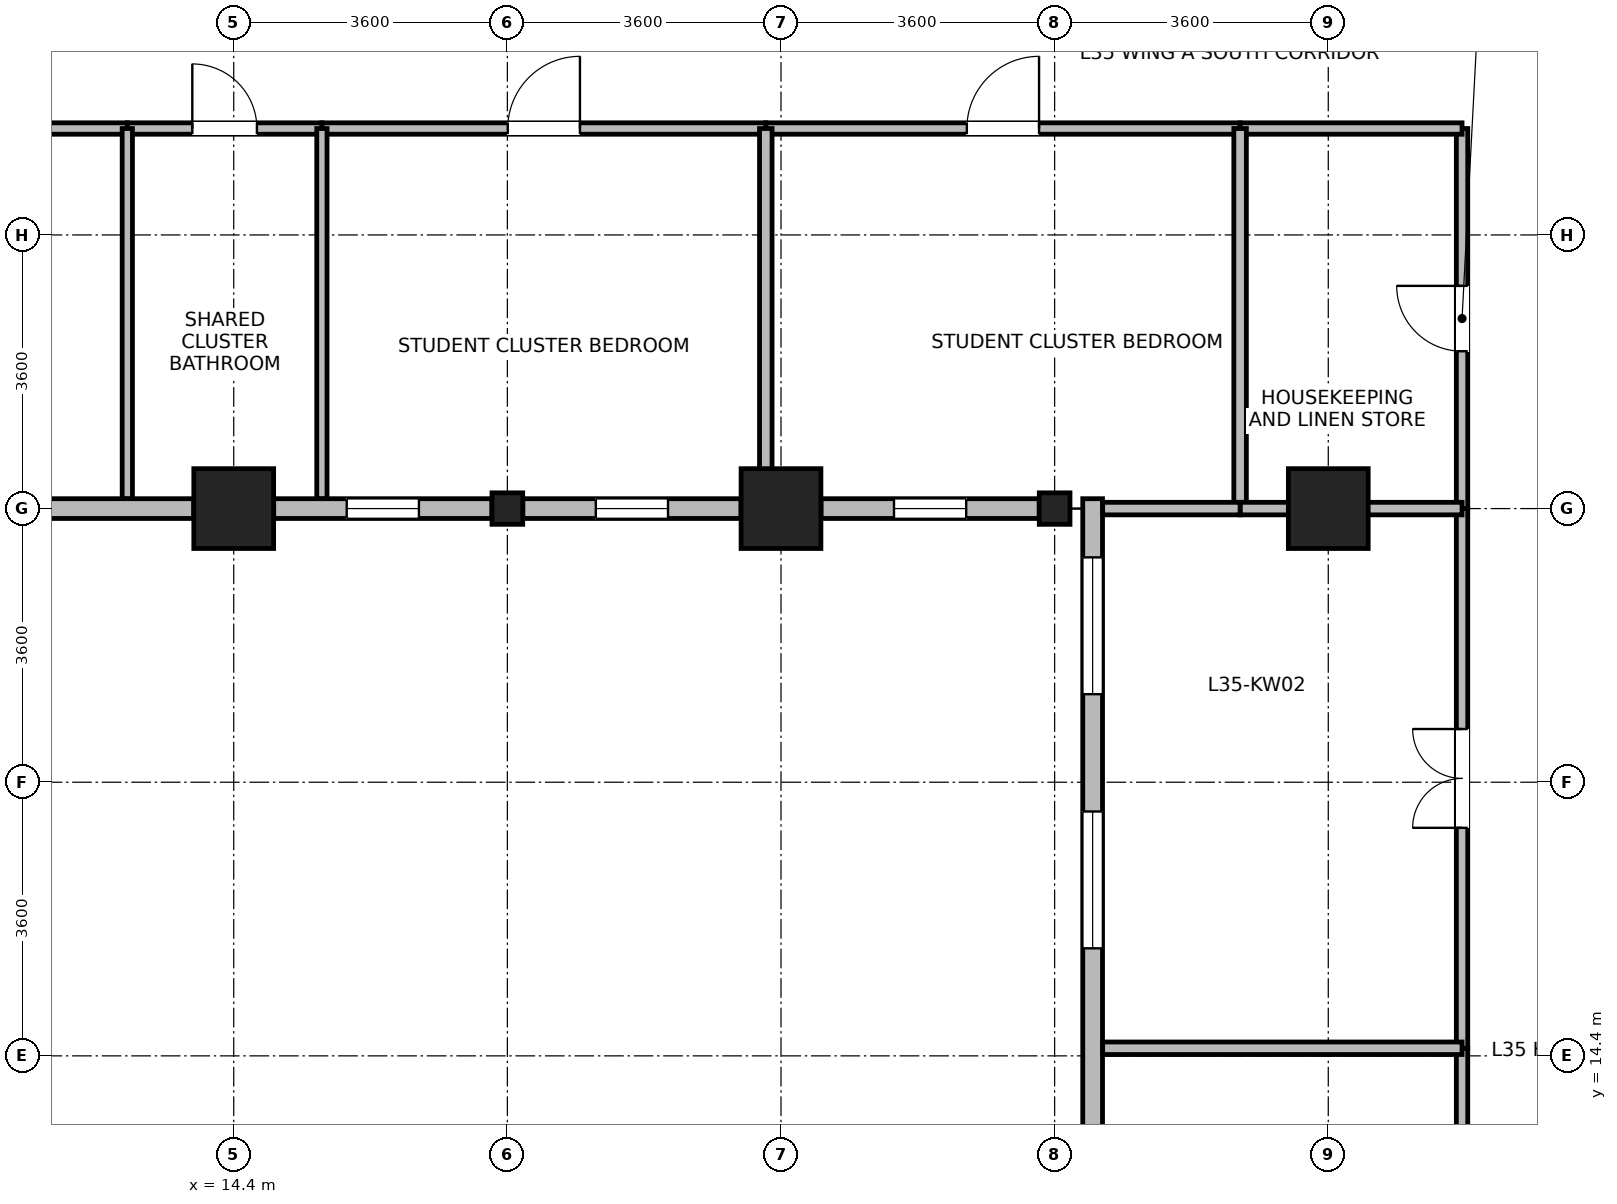
"""IFC4 building model, lengths in metres.
Left out: names, types, materials, properties, quantities, classifications, styles, units other than length and angle.
Written with IfcOpenShell. Run it as: python <this file> out.ifc"""

import sys

from ifc_helpers import new_model, si_unit, direction, frame, frame_2d, origin, origin_2d, place, context, subcontext, project, spatial, rectangle, i_section, extrude, source, transform, mapped, element, fill, save


model = new_model("IFC4")
c1 = context("Model", 3, precision=1e-05, world=origin(), true_north=direction((0.0, 1.0)))
c2 = subcontext(c1, "Body", "Model", "MODEL_VIEW")
j1 = project(units=[si_unit("LENGTHUNIT", "METRE"), si_unit("PLANEANGLEUNIT", "RADIAN")], contexts=[c1])
p1 = place(None, origin())
s1 = spatial("IfcSite", under=j1, at=p1, CompositionType="ELEMENT")
p2 = place(p1, origin())
s2 = spatial("IfcBuilding", under=s1, at=p2, CompositionType="ELEMENT")
p3 = place(p2, frame((0.0, 0.0, 140.2)))
s3 = spatial("IfcBuildingStorey", under=s2, at=p3, CompositionType="ELEMENT", Elevation=140.2)
m1 = source(origin(), c2, "Body", "SweptSolid", [
    extrude(rectangle(XDim=1.05, YDim=1.05, at=origin_2d()), origin(), (0.0, 0.0, 1.0), 3.7),
])
for number, where, z_axis, x_axis in (
    (1, (14.4, 21.6, 0.0), (0.0, 0.0, 1.0), (1.0, 0.0, 0.0)),
    (2, (21.6, 21.6, 0.0), (0.0, 0.0, 1.0), (1.0, 0.0, 0.0)),
    (3, (28.8, 21.6, 0.0), (0.0, 0.0, 1.0), (1.0, 0.0, 0.0)),
):
    element("IfcColumn", number, at=place(p3, frame(where, z_axis=z_axis, x_axis=x_axis)), inside=s3, PredefinedType="COLUMN", context=c2, shape_type="MappedRepresentation", body=[
        mapped(m1, transform((0.0, 0.0, 0.0), x_axis=(1.0, 0.0, 0.0), y_axis=(0.0, 1.0, 0.0), z_axis=(0.0, 0.0, 1.0), scale=1.0)),
    ])
m2 = source(origin(), c2, "Body", "SweptSolid", [
    extrude(i_section(OverallWidth=0.404, OverallDepth=0.414, WebThickness=0.021, FlangeThickness=0.028, FilletRadius=0.015, at=origin_2d()), origin(), (0.0, 0.0, 1.0), 3.7),
])
for number, where, z_axis, x_axis in (
    (4, (18.0, 21.6, 0.0), (0.0, 0.0, 1.0), (1.0, 0.0, 0.0)),
    (5, (25.2, 21.6, 0.0), (0.0, 0.0, 1.0), (1.0, 0.0, 0.0)),
):
    element("IfcColumn", number, at=place(p3, frame(where, z_axis=z_axis, x_axis=x_axis)), inside=s3, PredefinedType="COLUMN", context=c2, shape_type="MappedRepresentation", body=[
        mapped(m2, transform((0.0, 0.0, 0.0), x_axis=(1.0, 0.0, 0.0), y_axis=(0.0, 1.0, 0.0), z_axis=(0.0, 0.0, 1.0), scale=1.0)),
    ])
p4 = place(p3, frame((13.874, 21.6, 0.0), z_axis=(0.0, 0.0, 1.0), x_axis=(-1.0, 0.0, 0.0)))
e6 = element("IfcWall", 6, at=p4, inside=s3, PredefinedType="STANDARD", context=c2, shape_type="SweptSolid", body=[
    extrude(rectangle(XDim=13.337, YDim=0.26, at=frame_2d((6.668, 0.0))), origin(), (0.0, 0.0, 1.0), 3.44),
])
p5 = place(p4, frame((4.101, 0.0, 0.85)))
e7 = element("IfcOpeningElement", 7, at=p5, cuts=e6, PredefinedType="OPENING", context=c2, shape_type="SweptSolid", body=[
    extrude(rectangle(XDim=1.8, YDim=1.85, at=frame_2d((0.9, 0.925))), frame((0.0, 0.14, 0.0), z_axis=(0.0, -1.0, 0.0), x_axis=(1.0, 0.0, 0.0)), (0.0, 0.0, 1.0), 0.28),
])
p6 = place(p4, frame((7.436, 0.0, 0.85)))
e8 = element("IfcOpeningElement", 8, at=p6, cuts=e6, PredefinedType="OPENING", context=c2, shape_type="SweptSolid", body=[
    extrude(rectangle(XDim=1.8, YDim=1.85, at=frame_2d((0.9, 0.925))), frame((0.0, 0.14, 0.0), z_axis=(0.0, -1.0, 0.0), x_axis=(1.0, 0.0, 0.0)), (0.0, 0.0, 1.0), 0.28),
])
p7 = place(p4, frame((10.77, 0.0, 0.85)))
e9 = element("IfcOpeningElement", 9, at=p7, cuts=e6, PredefinedType="OPENING", context=c2, shape_type="SweptSolid", body=[
    extrude(rectangle(XDim=1.8, YDim=1.85, at=frame_2d((0.9, 0.925))), frame((0.0, 0.14, 0.0), z_axis=(0.0, -1.0, 0.0), x_axis=(1.0, 0.0, 0.0)), (0.0, 0.0, 1.0), 0.28),
])
p8 = place(p3, frame((17.797, 21.6, 0.0), z_axis=(0.0, 0.0, 1.0), x_axis=(-1.0, 0.0, 0.0)))
e10 = element("IfcWall", 10, at=p8, inside=s3, PredefinedType="STANDARD", context=c2, shape_type="SweptSolid", body=[
    extrude(rectangle(XDim=2.871, YDim=0.26, at=frame_2d((1.436, 0.0))), origin(), (0.0, 0.0, 1.0), 2.99),
])
p9 = place(p8, frame((0.96, 0.0, 0.85)))
e11 = element("IfcOpeningElement", 11, at=p9, cuts=e10, PredefinedType="OPENING", context=c2, shape_type="SweptSolid", body=[
    extrude(rectangle(XDim=0.95, YDim=1.75, at=frame_2d((0.475, 0.875))), frame((0.0, 0.14, 0.0), z_axis=(0.0, -1.0, 0.0), x_axis=(1.0, 0.0, 0.0)), (0.0, 0.0, 1.0), 0.28),
])
p10 = place(p3, frame((21.074, 21.6, 0.0), z_axis=(0.0, 0.0, 1.0), x_axis=(-1.0, 0.0, 0.0)))
e12 = element("IfcWall", 12, at=p10, inside=s3, PredefinedType="STANDARD", context=c2, shape_type="SweptSolid", body=[
    extrude(rectangle(XDim=2.871, YDim=0.26, at=frame_2d((1.436, 0.0))), origin(), (0.0, 0.0, 1.0), 2.99),
])
p11 = place(p10, frame((0.96, 0.0, 0.85)))
e13 = element("IfcOpeningElement", 13, at=p11, cuts=e12, PredefinedType="OPENING", context=c2, shape_type="SweptSolid", body=[
    extrude(rectangle(XDim=0.95, YDim=1.75, at=frame_2d((0.475, 0.875))), frame((0.0, 0.14, 0.0), z_axis=(0.0, -1.0, 0.0), x_axis=(1.0, 0.0, 0.0)), (0.0, 0.0, 1.0), 0.28),
])
p12 = place(p3, frame((24.997, 21.6, 0.0), z_axis=(0.0, 0.0, 1.0), x_axis=(-1.0, 0.0, 0.0)))
e14 = element("IfcWall", 14, at=p12, inside=s3, PredefinedType="STANDARD", context=c2, shape_type="SweptSolid", body=[
    extrude(rectangle(XDim=2.871, YDim=0.26, at=frame_2d((1.436, 0.0))), origin(), (0.0, 0.0, 1.0), 2.99),
])
p13 = place(p12, frame((0.96, 0.0, 0.85)))
e15 = element("IfcOpeningElement", 15, at=p13, cuts=e14, PredefinedType="OPENING", context=c2, shape_type="SweptSolid", body=[
    extrude(rectangle(XDim=0.95, YDim=1.75, at=frame_2d((0.475, 0.875))), frame((0.0, 0.14, 0.0), z_axis=(0.0, -1.0, 0.0), x_axis=(1.0, 0.0, 0.0)), (0.0, 0.0, 1.0), 0.28),
])
p14 = place(p3, frame((25.7, 1.67, 0.0), z_axis=(0.0, 0.0, 1.0), x_axis=(0.0, 1.0, 0.0)))
e16 = element("IfcWall", 16, at=p14, inside=s3, PredefinedType="STANDARD", context=c2, shape_type="SweptSolid", body=[
    extrude(rectangle(XDim=20.06, YDim=0.26, at=frame_2d((10.03, 0.0))), origin(), (0.0, 0.0, 1.0), 3.44),
])
p15 = place(p14, frame((0.772, 0.0, 0.85)))
e17 = element("IfcOpeningElement", 17, at=p15, cuts=e16, PredefinedType="OPENING", context=c2, shape_type="SweptSolid", body=[
    extrude(rectangle(XDim=1.8, YDim=1.85, at=frame_2d((0.9, 0.925))), frame((0.0, 0.14, 0.0), z_axis=(0.0, -1.0, 0.0), x_axis=(1.0, 0.0, 0.0)), (0.0, 0.0, 1.0), 0.28),
])
p16 = place(p14, frame((7.458, 0.0, 0.85)))
e18 = element("IfcOpeningElement", 18, at=p16, cuts=e16, PredefinedType="OPENING", context=c2, shape_type="SweptSolid", body=[
    extrude(rectangle(XDim=1.8, YDim=1.85, at=frame_2d((0.9, 0.925))), frame((0.0, 0.14, 0.0), z_axis=(0.0, -1.0, 0.0), x_axis=(1.0, 0.0, 0.0)), (0.0, 0.0, 1.0), 0.28),
])
p17 = place(p14, frame((14.145, 0.0, 0.85)))
e19 = element("IfcOpeningElement", 19, at=p17, cuts=e16, PredefinedType="OPENING", context=c2, shape_type="SweptSolid", body=[
    extrude(rectangle(XDim=1.8, YDim=1.85, at=frame_2d((0.9, 0.925))), frame((0.0, 0.14, 0.0), z_axis=(0.0, -1.0, 0.0), x_axis=(1.0, 0.0, 0.0)), (0.0, 0.0, 1.0), 0.28),
])
p18 = place(p14, frame((17.488, 0.0, 0.85)))
e20 = element("IfcOpeningElement", 20, at=p18, cuts=e16, PredefinedType="OPENING", context=c2, shape_type="SweptSolid", body=[
    extrude(rectangle(XDim=1.8, YDim=1.85, at=frame_2d((0.9, 0.925))), frame((0.0, 0.14, 0.0), z_axis=(0.0, -1.0, 0.0), x_axis=(1.0, 0.0, 0.0)), (0.0, 0.0, 1.0), 0.28),
])
p19 = place(p3, frame((0.52, 26.6, 0.0), z_axis=(0.0, 0.0, 1.0), x_axis=(1.0, 0.0, 0.0)))
e21 = element("IfcWall", 21, at=p19, inside=s3, PredefinedType="PARTITIONING", context=c2, shape_type="SweptSolid", body=[
    extrude(rectangle(XDim=12.48, YDim=0.15, at=frame_2d((6.24, 0.0))), origin(), (0.0, 0.0, 1.0), 3.44),
])
p20 = place(p19, frame((5.59, 0.0, 0.0)))
e22 = element("IfcOpeningElement", 22, at=p20, cuts=e21, PredefinedType="OPENING", context=c2, shape_type="SweptSolid", body=[
    extrude(rectangle(XDim=1.3, YDim=2.12, at=frame_2d((0.65, 1.06))), frame((0.0, 0.085, 0.0), z_axis=(0.0, -1.0, 0.0), x_axis=(1.0, 0.0, 0.0)), (0.0, 0.0, 1.0), 0.17),
])
p21 = place(p3, frame((30.56, 7.24, 0.0), z_axis=(0.0, 0.0, 1.0), x_axis=(0.0, 1.0, 0.0)))
e23 = element("IfcWall", 23, at=p21, inside=s3, PredefinedType="PARTITIONING", context=c2, shape_type="SweptSolid", body=[
    extrude(rectangle(XDim=7.26, YDim=0.15, at=frame_2d((3.63, 0.0))), origin(), (0.0, 0.0, 1.0), 3.44),
])
p22 = place(p21, frame((2.98, 0.0, 0.0)))
e24 = element("IfcOpeningElement", 24, at=p22, cuts=e23, PredefinedType="OPENING", context=c2, shape_type="SweptSolid", body=[
    extrude(rectangle(XDim=1.3, YDim=2.12, at=frame_2d((0.65, 1.06))), frame((0.0, 0.085, 0.0), z_axis=(0.0, -1.0, 0.0), x_axis=(1.0, 0.0, 0.0)), (0.0, 0.0, 1.0), 0.17),
])
p23 = place(p3, frame((30.56, 14.5, 0.0), z_axis=(0.0, 0.0, 1.0), x_axis=(0.0, 1.0, 0.0)))
e25 = element("IfcWall", 25, at=p23, inside=s3, PredefinedType="PARTITIONING", context=c2, shape_type="SweptSolid", body=[
    extrude(rectangle(XDim=7.1, YDim=0.15, at=frame_2d((3.55, 0.0))), origin(), (0.0, 0.0, 1.0), 3.44),
])
p24 = place(p23, frame((2.9, 0.0, 0.0)))
e26 = element("IfcOpeningElement", 26, at=p24, cuts=e25, PredefinedType="OPENING", context=c2, shape_type="SweptSolid", body=[
    extrude(rectangle(XDim=1.3, YDim=2.12, at=frame_2d((0.65, 1.06))), frame((0.0, 0.085, 0.0), z_axis=(0.0, -1.0, 0.0), x_axis=(1.0, 0.0, 0.0)), (0.0, 0.0, 1.0), 0.17),
])
p25 = place(p3, frame((21.4, 26.6, 0.0), z_axis=(0.0, 0.0, 1.0), x_axis=(1.0, 0.0, 0.0)))
e27 = element("IfcWall", 27, at=p25, inside=s3, PredefinedType="PARTITIONING", context=c2, shape_type="SweptSolid", body=[
    extrude(rectangle(XDim=6.24, YDim=0.15, at=frame_2d((3.12, 0.0))), origin(), (0.0, 0.0, 1.0), 3.44),
])
p26 = place(p25, frame((2.645, 0.0, 0.0)))
e28 = element("IfcOpeningElement", 28, at=p26, cuts=e27, PredefinedType="OPENING", context=c2, shape_type="SweptSolid", body=[
    extrude(rectangle(XDim=0.95, YDim=2.1, at=frame_2d((0.475, 1.05))), frame((0.0, 0.085, 0.0), z_axis=(0.0, -1.0, 0.0), x_axis=(1.0, 0.0, 0.0)), (0.0, 0.0, 1.0), 0.17),
])
p27 = place(p3, frame((15.56, 26.6, 0.0), z_axis=(0.0, 0.0, 1.0), x_axis=(1.0, 0.0, 0.0)))
e29 = element("IfcWall", 29, at=p27, inside=s3, PredefinedType="PARTITIONING", context=c2, shape_type="SweptSolid", body=[
    extrude(rectangle(XDim=5.84, YDim=0.15, at=frame_2d((2.92, 0.0))), origin(), (0.0, 0.0, 1.0), 3.44),
])
p28 = place(p27, frame((2.445, 0.0, 0.0)))
e30 = element("IfcOpeningElement", 30, at=p28, cuts=e29, PredefinedType="OPENING", context=c2, shape_type="SweptSolid", body=[
    extrude(rectangle(XDim=0.95, YDim=2.1, at=frame_2d((0.475, 1.05))), frame((0.0, 0.085, 0.0), z_axis=(0.0, -1.0, 0.0), x_axis=(1.0, 0.0, 0.0)), (0.0, 0.0, 1.0), 0.17),
])
p29 = place(p3, frame((30.56, 21.6, 0.0), z_axis=(0.0, 0.0, 1.0), x_axis=(0.0, 1.0, 0.0)))
e31 = element("IfcWall", 31, at=p29, inside=s3, PredefinedType="PARTITIONING", context=c2, shape_type="SweptSolid", body=[
    extrude(rectangle(XDim=5.0, YDim=0.15, at=frame_2d((2.5, 0.0))), origin(), (0.0, 0.0, 1.0), 3.44),
])
p30 = place(p29, frame((2.07, 0.0, 0.0)))
e32 = element("IfcOpeningElement", 32, at=p30, cuts=e31, PredefinedType="OPENING", context=c2, shape_type="SweptSolid", body=[
    extrude(rectangle(XDim=0.86, YDim=2.02, at=frame_2d((0.43, 1.01))), frame((0.0, 0.085, 0.0), z_axis=(0.0, -1.0, 0.0), x_axis=(1.0, 0.0, 0.0)), (0.0, 0.0, 1.0), 0.17),
])
p31 = place(p3, frame((27.64, 26.6, 0.0), z_axis=(0.0, 0.0, 1.0), x_axis=(1.0, 0.0, 0.0)))
e33 = element("IfcWall", 33, at=p31, inside=s3, PredefinedType="PARTITIONING", context=c2, shape_type="SweptSolid", body=[
    extrude(rectangle(XDim=2.92, YDim=0.15, at=frame_2d((1.46, 0.0))), origin(), (0.0, 0.0, 1.0), 3.44),
])
p32 = place(p3, frame((13.0, 26.6, 0.0), z_axis=(0.0, 0.0, 1.0), x_axis=(1.0, 0.0, 0.0)))
e34 = element("IfcWall", 34, at=p32, inside=s3, PredefinedType="PARTITIONING", context=c2, shape_type="SweptSolid", body=[
    extrude(rectangle(XDim=2.56, YDim=0.15, at=frame_2d((1.28, 0.0))), origin(), (0.0, 0.0, 1.0), 3.44),
])
p33 = place(p32, frame((0.855, 0.0, 0.0)))
e35 = element("IfcOpeningElement", 35, at=p33, cuts=e34, PredefinedType="OPENING", context=c2, shape_type="SweptSolid", body=[
    extrude(rectangle(XDim=0.85, YDim=2.04, at=frame_2d((0.425, 1.02))), frame((0.0, 0.085, 0.0), z_axis=(0.0, -1.0, 0.0), x_axis=(1.0, 0.0, 0.0)), (0.0, 0.0, 1.0), 0.17),
])
for number, where, z_axis, x_axis in (
    (36, (13.0, 21.732, 0.0), (0.0, 0.0, 1.0), (0.0, 1.0, 0.0)),
    (37, (15.56, 21.732, 0.0), (0.0, 0.0, 1.0), (0.0, 1.0, 0.0)),
):
    element("IfcWall", number, at=place(p3, frame(where, z_axis=z_axis, x_axis=x_axis)), inside=s3, PredefinedType="PARTITIONING", context=c2, shape_type="SweptSolid", body=[
        extrude(rectangle(XDim=4.868, YDim=0.135, at=frame_2d((2.434, 0.0))), origin(), (0.0, 0.0, 1.0), 3.44),
    ])
p34 = place(p3, frame((21.4, 21.732, 0.0), z_axis=(0.0, 0.0, 1.0), x_axis=(0.0, 1.0, 0.0)))
e38 = element("IfcWall", 38, at=p34, inside=s3, PredefinedType="PARTITIONING", context=c2, shape_type="SweptSolid", body=[
    extrude(rectangle(XDim=4.868, YDim=0.165, at=frame_2d((2.434, 0.0))), origin(), (0.0, 0.0, 1.0), 2.94),
])
p35 = place(p3, frame((27.64, 21.6, 0.0), z_axis=(0.0, 0.0, 1.0), x_axis=(0.0, 1.0, 0.0)))
e39 = element("IfcWall", 39, at=p35, inside=s3, PredefinedType="PARTITIONING", context=c2, shape_type="SweptSolid", body=[
    extrude(rectangle(XDim=5.0, YDim=0.165, at=frame_2d((2.5, 0.0))), origin(), (0.0, 0.0, 1.0), 3.44),
])
p36 = place(p3, frame((25.832, 14.5, 0.0), z_axis=(0.0, 0.0, 1.0), x_axis=(1.0, 0.0, 0.0)))
e40 = element("IfcWall", 40, at=p36, inside=s3, PredefinedType="PARTITIONING", context=c2, shape_type="SweptSolid", body=[
    extrude(rectangle(XDim=4.728, YDim=0.165, at=frame_2d((2.364, 0.0))), origin(), (0.0, 0.0, 1.0), 3.44),
])
p37 = place(p3, frame((27.64, 21.6, 0.0), z_axis=(0.0, 0.0, 1.0), x_axis=(1.0, 0.0, 0.0)))
e41 = element("IfcWall", 41, at=p37, inside=s3, PredefinedType="PARTITIONING", context=c2, shape_type="SweptSolid", body=[
    extrude(rectangle(XDim=2.92, YDim=0.165, at=frame_2d((1.46, 0.0))), origin(), (0.0, 0.0, 1.0), 2.99),
])
p38 = place(p3, frame((25.832, 21.6, 0.0), z_axis=(0.0, 0.0, 1.0), x_axis=(1.0, 0.0, 0.0)))
e42 = element("IfcWall", 42, at=p38, inside=s3, PredefinedType="PARTITIONING", context=c2, shape_type="SweptSolid", body=[
    extrude(rectangle(XDim=1.808, YDim=0.165, at=frame_2d((0.904, 0.0))), origin(), (0.0, 0.0, 1.0), 2.99),
])
p39 = place(p9, origin())
e43 = element("IfcWindow", 43, at=p39, inside=s3, PartitioningType="SINGLE_PANEL", PredefinedType="WINDOW", context=c2, shape_type="SweptSolid", body=[
    extrude(rectangle(XDim=0.95, YDim=1.75, at=frame_2d((0.475, 0.875))), frame((0.0, 0.03, 0.0), z_axis=(0.0, -1.0, 0.0), x_axis=(1.0, 0.0, 0.0)), (0.0, 0.0, 1.0), 0.06),
])
fill(e11, e43)
p40 = place(p11, origin())
e44 = element("IfcWindow", 44, at=p40, inside=s3, PartitioningType="SINGLE_PANEL", PredefinedType="WINDOW", context=c2, shape_type="SweptSolid", body=[
    extrude(rectangle(XDim=0.95, YDim=1.75, at=frame_2d((0.475, 0.875))), frame((0.0, 0.03, 0.0), z_axis=(0.0, -1.0, 0.0), x_axis=(1.0, 0.0, 0.0)), (0.0, 0.0, 1.0), 0.06),
])
fill(e13, e44)
p41 = place(p13, origin())
e45 = element("IfcWindow", 45, at=p41, inside=s3, PartitioningType="SINGLE_PANEL", PredefinedType="WINDOW", context=c2, shape_type="SweptSolid", body=[
    extrude(rectangle(XDim=0.95, YDim=1.75, at=frame_2d((0.475, 0.875))), frame((0.0, 0.03, 0.0), z_axis=(0.0, -1.0, 0.0), x_axis=(1.0, 0.0, 0.0)), (0.0, 0.0, 1.0), 0.06),
])
fill(e15, e45)
p42 = place(p17, origin())
e46 = element("IfcWindow", 46, at=p42, inside=s3, PartitioningType="SINGLE_PANEL", PredefinedType="WINDOW", context=c2, shape_type="SweptSolid", body=[
    extrude(rectangle(XDim=1.8, YDim=1.85, at=frame_2d((0.9, 0.925))), frame((0.0, 0.03, 0.0), z_axis=(0.0, -1.0, 0.0), x_axis=(1.0, 0.0, 0.0)), (0.0, 0.0, 1.0), 0.06),
])
fill(e19, e46)
p43 = place(p18, origin())
e47 = element("IfcWindow", 47, at=p43, inside=s3, PartitioningType="SINGLE_PANEL", PredefinedType="WINDOW", context=c2, shape_type="SweptSolid", body=[
    extrude(rectangle(XDim=1.8, YDim=1.85, at=frame_2d((0.9, 0.925))), frame((0.0, 0.03, 0.0), z_axis=(0.0, -1.0, 0.0), x_axis=(1.0, 0.0, 0.0)), (0.0, 0.0, 1.0), 0.06),
])
fill(e20, e47)
p44 = place(p24, origin())
e48 = element("IfcDoor", 48, at=p44, inside=s3, OperationType="DOUBLE_DOOR_SINGLE_SWING", PredefinedType="DOOR", context=c2, shape_type="SweptSolid", body=[
    extrude(rectangle(XDim=1.3, YDim=2.12, at=frame_2d((0.65, 1.06))), frame((0.0, 0.025, 0.0), z_axis=(0.0, -1.0, 0.0), x_axis=(1.0, 0.0, 0.0)), (0.0, 0.0, 1.0), 0.05),
])
fill(e26, e48)
p45 = place(p26, origin())
e49 = element("IfcDoor", 49, at=p45, inside=s3, OperationType="SINGLE_SWING_RIGHT", PredefinedType="DOOR", context=c2, shape_type="SweptSolid", body=[
    extrude(rectangle(XDim=0.95, YDim=2.1, at=frame_2d((0.475, 1.05))), frame((0.0, 0.025, 0.0), z_axis=(0.0, -1.0, 0.0), x_axis=(1.0, 0.0, 0.0)), (0.0, 0.0, 1.0), 0.05),
])
fill(e28, e49)
p46 = place(p28, origin())
e50 = element("IfcDoor", 50, at=p46, inside=s3, OperationType="SINGLE_SWING_RIGHT", PredefinedType="DOOR", context=c2, shape_type="SweptSolid", body=[
    extrude(rectangle(XDim=0.95, YDim=2.1, at=frame_2d((0.475, 1.05))), frame((0.0, 0.025, 0.0), z_axis=(0.0, -1.0, 0.0), x_axis=(1.0, 0.0, 0.0)), (0.0, 0.0, 1.0), 0.05),
])
fill(e30, e50)
p47 = place(p30, origin())
e51 = element("IfcDoor", 51, at=p47, inside=s3, OperationType="SINGLE_SWING_RIGHT", PredefinedType="DOOR", context=c2, shape_type="SweptSolid", body=[
    extrude(rectangle(XDim=0.86, YDim=2.02, at=frame_2d((0.43, 1.01))), frame((0.0, 0.025, 0.0), z_axis=(0.0, -1.0, 0.0), x_axis=(1.0, 0.0, 0.0)), (0.0, 0.0, 1.0), 0.05),
])
fill(e32, e51)
p48 = place(p33, origin())
e52 = element("IfcDoor", 52, at=p48, inside=s3, OperationType="SINGLE_SWING_LEFT", PredefinedType="DOOR", context=c2, shape_type="SweptSolid", body=[
    extrude(rectangle(XDim=0.85, YDim=2.04, at=frame_2d((0.425, 1.02))), frame((0.0, 0.025, 0.0), z_axis=(0.0, -1.0, 0.0), x_axis=(1.0, 0.0, 0.0)), (0.0, 0.0, 1.0), 0.05),
])
fill(e35, e52)
save(model, sys.argv[1])
